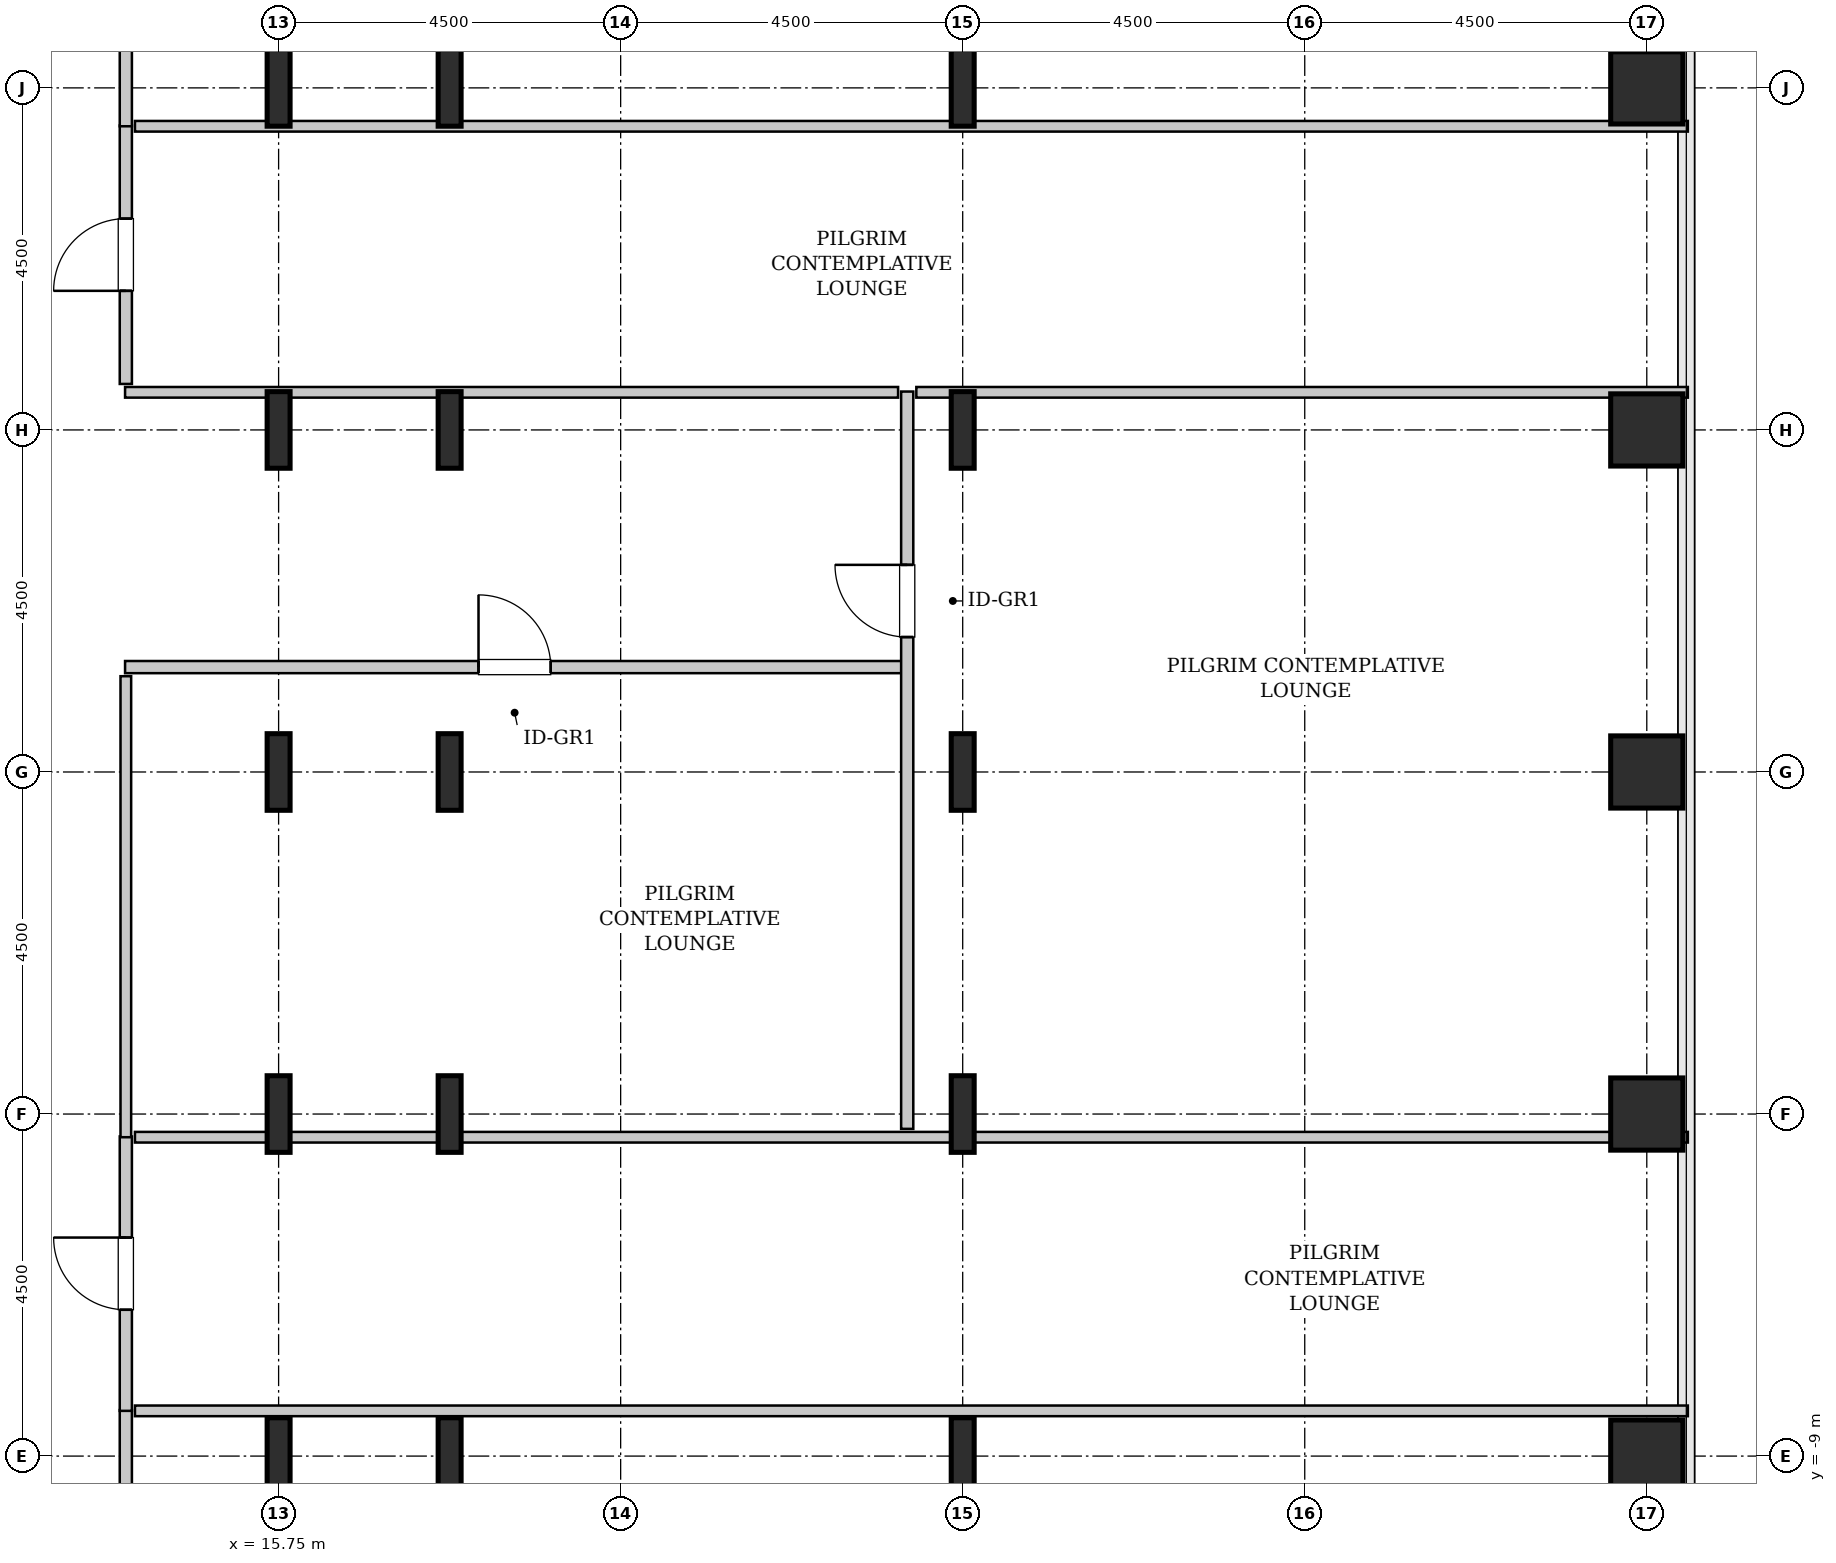
"""IFC4 building model, lengths in metres.
Left out: names, types, materials, properties, quantities, classifications, styles, units other than length and angle.
Written with IfcOpenShell. Run it as: python <this file> out.ifc"""

import sys

from ifc_helpers import new_model, si_unit, direction, frame, frame_2d, origin, origin_2d, place, context, subcontext, project, spatial, rectangle, hollow_rectangle, i_section, extrude, source, transform, mapped, element, fill, save


model = new_model("IFC4")
c1 = context("Model", 3, precision=1e-05, world=origin(), true_north=direction((0.0, 1.0)))
c2 = subcontext(c1, "Body", "Model", "MODEL_VIEW")
j1 = project(units=[si_unit("LENGTHUNIT", "METRE"), si_unit("PLANEANGLEUNIT", "RADIAN")], contexts=[c1])
p1 = place(None, origin())
s1 = spatial("IfcSite", under=j1, at=p1, CompositionType="ELEMENT")
p2 = place(p1, origin())
s2 = spatial("IfcBuilding", under=s1, at=p2, CompositionType="ELEMENT")
p3 = place(p2, frame((0.0, 0.0, 40.6)))
s3 = spatial("IfcBuildingStorey", under=s2, at=p3, CompositionType="ELEMENT", Elevation=40.6)
m1 = source(origin(), c2, "Body", "SweptSolid", [
    extrude(i_section(OverallWidth=0.302, OverallDepth=1.008, WebThickness=0.021, FlangeThickness=0.04, FilletRadius=0.03, at=origin_2d()), origin(), (0.0, 0.0, 1.0), 3.8),
])
for number, where, z_axis, x_axis in (
    (1, (15.75, -9.0, 0.0), (0.0, 0.0, 1.0), (1.0, 0.0, 0.0)),
    (2, (15.75, -4.5, 0.0), (0.0, 0.0, 1.0), (1.0, 0.0, 0.0)),
    (3, (15.75, 0.0, 0.0), (0.0, 0.0, 1.0), (1.0, 0.0, 0.0)),
    (4, (15.75, 4.5, 0.0), (0.0, 0.0, 1.0), (1.0, 0.0, 0.0)),
    (5, (15.75, 9.0, 0.0), (0.0, 0.0, 1.0), (1.0, 0.0, 0.0)),
    (6, (18.0, -9.0, 0.0), (0.0, 0.0, 1.0), (1.0, 0.0, 0.0)),
    (7, (18.0, -4.5, 0.0), (0.0, 0.0, 1.0), (1.0, 0.0, 0.0)),
    (8, (18.0, 0.0, 0.0), (0.0, 0.0, 1.0), (1.0, 0.0, 0.0)),
    (9, (18.0, 4.5, 0.0), (0.0, 0.0, 1.0), (1.0, 0.0, 0.0)),
    (10, (18.0, 9.0, 0.0), (0.0, 0.0, 1.0), (1.0, 0.0, 0.0)),
    (11, (24.75, -9.0, 0.0), (0.0, 0.0, 1.0), (1.0, 0.0, 0.0)),
    (12, (24.75, -4.5, 0.0), (0.0, 0.0, 1.0), (1.0, 0.0, 0.0)),
    (13, (24.75, 0.0, 0.0), (0.0, 0.0, 1.0), (1.0, 0.0, 0.0)),
    (14, (24.75, 4.5, 0.0), (0.0, 0.0, 1.0), (1.0, 0.0, 0.0)),
    (15, (24.75, 9.0, 0.0), (0.0, 0.0, 1.0), (1.0, 0.0, 0.0)),
):
    element("IfcColumn", number, at=place(p3, frame(where, z_axis=z_axis, x_axis=x_axis)), inside=s3, PredefinedType="COLUMN", context=c2, shape_type="MappedRepresentation", body=[
        mapped(m1, transform((0.0, 0.0, 0.0), x_axis=(1.0, 0.0, 0.0), y_axis=(0.0, 1.0, 0.0), z_axis=(0.0, 0.0, 1.0), scale=1.0)),
    ])
m2 = source(origin(), c2, "Body", "SweptSolid", [
    extrude(hollow_rectangle(XDim=0.95, YDim=0.95, WallThickness=0.045, InnerFilletRadius=0.045, OuterFilletRadius=0.09, at=origin_2d()), origin(), (0.0, 0.0, 1.0), 3.8),
])
for number, where, z_axis, x_axis in (
    (16, (33.75, -9.0, 0.0), (0.0, 0.0, 1.0), (1.0, 0.0, 0.0)),
    (17, (33.75, -4.5, 0.0), (0.0, 0.0, 1.0), (1.0, 0.0, 0.0)),
    (18, (33.75, 0.0, 0.0), (0.0, 0.0, 1.0), (1.0, 0.0, 0.0)),
    (19, (33.75, 4.5, 0.0), (0.0, 0.0, 1.0), (1.0, 0.0, 0.0)),
    (20, (33.75, 9.0, 0.0), (0.0, 0.0, 1.0), (1.0, 0.0, 0.0)),
):
    element("IfcColumn", number, at=place(p3, frame(where, z_axis=z_axis, x_axis=x_axis)), inside=s3, PredefinedType="COLUMN", context=c2, shape_type="MappedRepresentation", body=[
        mapped(m2, transform((0.0, 0.0, 0.0), x_axis=(1.0, 0.0, 0.0), y_axis=(0.0, 1.0, 0.0), z_axis=(0.0, 0.0, 1.0), scale=1.0)),
    ])
m3 = source(origin(), c2, "Body", "SweptSolid", [
    extrude(rectangle(XDim=14.645, YDim=0.16, at=frame_2d((7.323, 0.0))), origin(), (0.0, 0.0, 1.0), 3.535),
])
p4 = place(p3, frame((13.74, -23.04, 0.0), z_axis=(0.0, 0.0, 1.0), x_axis=(0.0, 1.0, 0.0)))
e21 = element("IfcWall", 21, at=p4, inside=s3, PredefinedType="PARTITIONING", context=c2, shape_type="MappedRepresentation", body=[
    mapped(m3, transform((0.0, 0.0, 0.0), x_axis=(1.0, 0.0, 0.0), y_axis=(0.0, 1.0, 0.0), z_axis=(0.0, 0.0, 1.0), scale=1.0)),
])
p5 = place(p4, frame((12.613, 0.0, 0.0)))
e22 = element("IfcOpeningElement", 22, at=p5, cuts=e21, PredefinedType="OPENING", context=c2, shape_type="SweptSolid", body=[
    extrude(rectangle(XDim=0.95, YDim=2.1, at=frame_2d((0.475, 1.05))), frame((0.0, 0.09, 0.0), z_axis=(0.0, -1.0, 0.0), x_axis=(1.0, 0.0, 0.0)), (0.0, 0.0, 1.0), 0.18),
])
m4 = source(origin(), c2, "Body", "SweptSolid", [
    extrude(rectangle(XDim=20.43, YDim=0.14, at=frame_2d((10.215, 0.0))), origin(), (0.0, 0.0, 1.0), 3.535),
])
p6 = place(p3, frame((13.86, -8.405, 0.0), z_axis=(0.0, 0.0, 1.0), x_axis=(1.0, 0.0, 0.0)))
e23 = element("IfcWall", 23, at=p6, inside=s3, PredefinedType="PARTITIONING", context=c2, shape_type="MappedRepresentation", body=[
    mapped(m4, transform((0.0, 0.0, 0.0), x_axis=(1.0, 0.0, 0.0), y_axis=(0.0, 1.0, 0.0), z_axis=(0.0, 0.0, 1.0), scale=1.0)),
])
m5 = source(origin(), c2, "Body", "SweptSolid", [
    extrude(rectangle(XDim=3.61, YDim=0.16, at=frame_2d((1.805, 0.0))), origin(), (0.0, 0.0, 1.0), 3.535),
])
p7 = place(p3, frame((13.74, -8.405, 0.0), z_axis=(0.0, 0.0, 1.0), x_axis=(0.0, 1.0, 0.0)))
e24 = element("IfcWall", 24, at=p7, inside=s3, PredefinedType="PARTITIONING", context=c2, shape_type="MappedRepresentation", body=[
    mapped(m5, transform((0.0, 0.0, 0.0), x_axis=(1.0, 0.0, 0.0), y_axis=(0.0, 1.0, 0.0), z_axis=(0.0, 0.0, 1.0), scale=1.0)),
])
p8 = place(p7, frame((1.33, 0.0, 0.0)))
e25 = element("IfcOpeningElement", 25, at=p8, cuts=e24, PredefinedType="OPENING", context=c2, shape_type="SweptSolid", body=[
    extrude(rectangle(XDim=0.95, YDim=2.1, at=frame_2d((0.475, 1.05))), frame((0.0, 0.09, 0.0), z_axis=(0.0, -1.0, 0.0), x_axis=(1.0, 0.0, 0.0)), (0.0, 0.0, 1.0), 0.18),
])
m6 = source(origin(), c2, "Body", "SweptSolid", [
    extrude(rectangle(XDim=20.43, YDim=0.14, at=frame_2d((10.215, 0.0))), origin(), (0.0, 0.0, 1.0), 2.825),
])
p9 = place(p3, frame((13.86, -4.805, 0.0), z_axis=(0.0, 0.0, 1.0), x_axis=(1.0, 0.0, 0.0)))
e26 = element("IfcWall", 26, at=p9, inside=s3, PredefinedType="PARTITIONING", context=c2, shape_type="MappedRepresentation", body=[
    mapped(m6, transform((0.0, 0.0, 0.0), x_axis=(1.0, 0.0, 0.0), y_axis=(0.0, 1.0, 0.0), z_axis=(0.0, 0.0, 1.0), scale=1.0)),
])
m7 = source(origin(), c2, "Body", "SweptSolid", [
    extrude(rectangle(XDim=10.25, YDim=0.16, at=frame_2d((5.125, 0.0))), origin(), (0.0, 0.0, 1.0), 3.535),
])
p10 = place(p3, frame((13.73, 1.38, 0.0), z_axis=(0.0, 0.0, 1.0), x_axis=(1.0, 0.0, 0.0)))
e27 = element("IfcWall", 27, at=p10, inside=s3, PredefinedType="PARTITIONING", context=c2, shape_type="MappedRepresentation", body=[
    mapped(m7, transform((0.0, 0.0, 0.0), x_axis=(1.0, 0.0, 0.0), y_axis=(0.0, 1.0, 0.0), z_axis=(0.0, 0.0, 1.0), scale=1.0)),
])
p11 = place(p10, frame((4.65, 0.0, 0.0)))
e28 = element("IfcOpeningElement", 28, at=p11, cuts=e27, PredefinedType="OPENING", context=c2, shape_type="SweptSolid", body=[
    extrude(rectangle(XDim=0.95, YDim=2.1, at=frame_2d((0.475, 1.05))), frame((0.0, 0.09, 0.0), z_axis=(0.0, -1.0, 0.0), x_axis=(1.0, 0.0, 0.0)), (0.0, 0.0, 1.0), 0.18),
])
m8 = source(origin(), c2, "Body", "SweptSolid", [
    extrude(rectangle(XDim=6.065, YDim=0.14, at=frame_2d((3.032, 0.0))), origin(), (0.0, 0.0, 1.0), 3.535),
])
p12 = place(p3, frame((13.74, -4.805, 0.0), z_axis=(0.0, 0.0, 1.0), x_axis=(0.0, 1.0, 0.0)))
e29 = element("IfcWall", 29, at=p12, inside=s3, PredefinedType="PARTITIONING", context=c2, shape_type="MappedRepresentation", body=[
    mapped(m8, transform((0.0, 0.0, 0.0), x_axis=(1.0, 0.0, 0.0), y_axis=(0.0, 1.0, 0.0), z_axis=(0.0, 0.0, 1.0), scale=1.0)),
])
m9 = source(origin(), c2, "Body", "SweptSolid", [
    extrude(rectangle(XDim=9.7, YDim=0.16, at=frame_2d((4.85, 0.0))), origin(), (0.0, 0.0, 1.0), 3.535),
])
p13 = place(p3, frame((24.02, -4.695, 0.0), z_axis=(0.0, 0.0, 1.0), x_axis=(0.0, 1.0, 0.0)))
e30 = element("IfcWall", 30, at=p13, inside=s3, PredefinedType="PARTITIONING", context=c2, shape_type="MappedRepresentation", body=[
    mapped(m9, transform((0.0, 0.0, 0.0), x_axis=(1.0, 0.0, 0.0), y_axis=(0.0, 1.0, 0.0), z_axis=(0.0, 0.0, 1.0), scale=1.0)),
])
p14 = place(p13, frame((6.47, 0.0, 0.0)))
e31 = element("IfcOpeningElement", 31, at=p14, cuts=e30, PredefinedType="OPENING", context=c2, shape_type="SweptSolid", body=[
    extrude(rectangle(XDim=0.95, YDim=2.1, at=frame_2d((0.475, 1.05))), frame((0.0, 0.09, 0.0), z_axis=(0.0, -1.0, 0.0), x_axis=(1.0, 0.0, 0.0)), (0.0, 0.0, 1.0), 0.18),
])
m10 = source(origin(), c2, "Body", "SweptSolid", [
    extrude(rectangle(XDim=10.17, YDim=0.14, at=frame_2d((5.085, 0.0))), origin(), (0.0, 0.0, 1.0), 2.825),
])
p15 = place(p3, frame((13.73, 4.995, 0.0), z_axis=(0.0, 0.0, 1.0), x_axis=(1.0, 0.0, 0.0)))
e32 = element("IfcWall", 32, at=p15, inside=s3, PredefinedType="PARTITIONING", context=c2, shape_type="MappedRepresentation", body=[
    mapped(m10, transform((0.0, 0.0, 0.0), x_axis=(1.0, 0.0, 0.0), y_axis=(0.0, 1.0, 0.0), z_axis=(0.0, 0.0, 1.0), scale=1.0)),
])
m11 = source(origin(), c2, "Body", "SweptSolid", [
    extrude(rectangle(XDim=10.15, YDim=0.14, at=frame_2d((5.075, 0.0))), origin(), (0.0, 0.0, 1.0), 2.825),
])
p16 = place(p3, frame((24.14, 4.995, 0.0), z_axis=(0.0, 0.0, 1.0), x_axis=(1.0, 0.0, 0.0)))
e33 = element("IfcWall", 33, at=p16, inside=s3, PredefinedType="PARTITIONING", context=c2, shape_type="MappedRepresentation", body=[
    mapped(m11, transform((0.0, 0.0, 0.0), x_axis=(1.0, 0.0, 0.0), y_axis=(0.0, 1.0, 0.0), z_axis=(0.0, 0.0, 1.0), scale=1.0)),
])
m12 = source(origin(), c2, "Body", "SweptSolid", [
    extrude(rectangle(XDim=3.4, YDim=0.16, at=frame_2d((1.7, 0.0))), origin(), (0.0, 0.0, 1.0), 3.535),
])
p17 = place(p3, frame((13.74, 5.105, 0.0), z_axis=(0.0, 0.0, 1.0), x_axis=(0.0, 1.0, 0.0)))
e34 = element("IfcWall", 34, at=p17, inside=s3, PredefinedType="PARTITIONING", context=c2, shape_type="MappedRepresentation", body=[
    mapped(m12, transform((0.0, 0.0, 0.0), x_axis=(1.0, 0.0, 0.0), y_axis=(0.0, 1.0, 0.0), z_axis=(0.0, 0.0, 1.0), scale=1.0)),
])
p18 = place(p17, frame((1.225, 0.0, 0.0)))
e35 = element("IfcOpeningElement", 35, at=p18, cuts=e34, PredefinedType="OPENING", context=c2, shape_type="SweptSolid", body=[
    extrude(rectangle(XDim=0.95, YDim=2.1, at=frame_2d((0.475, 1.05))), frame((0.0, 0.09, 0.0), z_axis=(0.0, -1.0, 0.0), x_axis=(1.0, 0.0, 0.0)), (0.0, 0.0, 1.0), 0.18),
])
p19 = place(p3, frame((13.86, 8.495, 0.0), z_axis=(0.0, 0.0, 1.0), x_axis=(1.0, 0.0, 0.0)))
e36 = element("IfcWall", 36, at=p19, inside=s3, PredefinedType="PARTITIONING", context=c2, shape_type="MappedRepresentation", body=[
    mapped(m6, transform((0.0, 0.0, 0.0), x_axis=(1.0, 0.0, 0.0), y_axis=(0.0, 1.0, 0.0), z_axis=(0.0, 0.0, 1.0), scale=1.0)),
])
m13 = source(origin(), c2, "Body", "SweptSolid", [
    extrude(rectangle(XDim=14.545, YDim=0.16, at=frame_2d((7.272, 0.0))), origin(), (0.0, 0.0, 1.0), 3.535),
])
p20 = place(p3, frame((13.74, 8.495, 0.0), z_axis=(0.0, 0.0, 1.0), x_axis=(0.0, 1.0, 0.0)))
e37 = element("IfcWall", 37, at=p20, inside=s3, PredefinedType="PARTITIONING", context=c2, shape_type="MappedRepresentation", body=[
    mapped(m13, transform((0.0, 0.0, 0.0), x_axis=(1.0, 0.0, 0.0), y_axis=(0.0, 1.0, 0.0), z_axis=(0.0, 0.0, 1.0), scale=1.0)),
])
p21 = place(p20, frame((1.032, 0.0, 0.0)))
e38 = element("IfcOpeningElement", 38, at=p21, cuts=e37, PredefinedType="OPENING", context=c2, shape_type="SweptSolid", body=[
    extrude(rectangle(XDim=0.95, YDim=2.1, at=frame_2d((0.475, 1.05))), frame((0.0, 0.09, 0.0), z_axis=(0.0, -1.0, 0.0), x_axis=(1.0, 0.0, 0.0)), (0.0, 0.0, 1.0), 0.18),
])
m14 = source(origin(), c2, "Body", "SweptSolid", [
    extrude(rectangle(XDim=0.95, YDim=2.1, at=frame_2d((0.475, 1.05))), frame((0.0, 0.025, 0.0), z_axis=(0.0, -1.0, 0.0), x_axis=(1.0, 0.0, 0.0)), (0.0, 0.0, 1.0), 0.05),
])
p22 = place(p8, origin())
e39 = element("IfcDoor", 39, at=p22, inside=s3, OperationType="SINGLE_SWING_RIGHT", PredefinedType="DOOR", context=c2, shape_type="MappedRepresentation", body=[
    mapped(m14, transform((0.0, 0.0, 0.0), x_axis=(1.0, 0.0, 0.0), y_axis=(0.0, 1.0, 0.0), z_axis=(0.0, 0.0, 1.0), scale=1.0)),
])
fill(e25, e39)
p23 = place(p11, origin())
e40 = element("IfcDoor", 40, at=p23, inside=s3, OperationType="SINGLE_SWING_LEFT", PredefinedType="DOOR", context=c2, shape_type="MappedRepresentation", body=[
    mapped(m14, transform((0.0, 0.0, 0.0), x_axis=(1.0, 0.0, 0.0), y_axis=(0.0, 1.0, 0.0), z_axis=(0.0, 0.0, 1.0), scale=1.0)),
])
fill(e28, e40)
p24 = place(p14, origin())
e41 = element("IfcDoor", 41, at=p24, inside=s3, OperationType="SINGLE_SWING_RIGHT", PredefinedType="DOOR", context=c2, shape_type="MappedRepresentation", body=[
    mapped(m14, transform((0.0, 0.0, 0.0), x_axis=(1.0, 0.0, 0.0), y_axis=(0.0, 1.0, 0.0), z_axis=(0.0, 0.0, 1.0), scale=1.0)),
])
fill(e31, e41)
p25 = place(p18, origin())
e42 = element("IfcDoor", 42, at=p25, inside=s3, OperationType="SINGLE_SWING_LEFT", PredefinedType="DOOR", context=c2, shape_type="MappedRepresentation", body=[
    mapped(m14, transform((0.0, 0.0, 0.0), x_axis=(1.0, 0.0, 0.0), y_axis=(0.0, 1.0, 0.0), z_axis=(0.0, 0.0, 1.0), scale=1.0)),
])
fill(e35, e42)
save(model, sys.argv[1])
